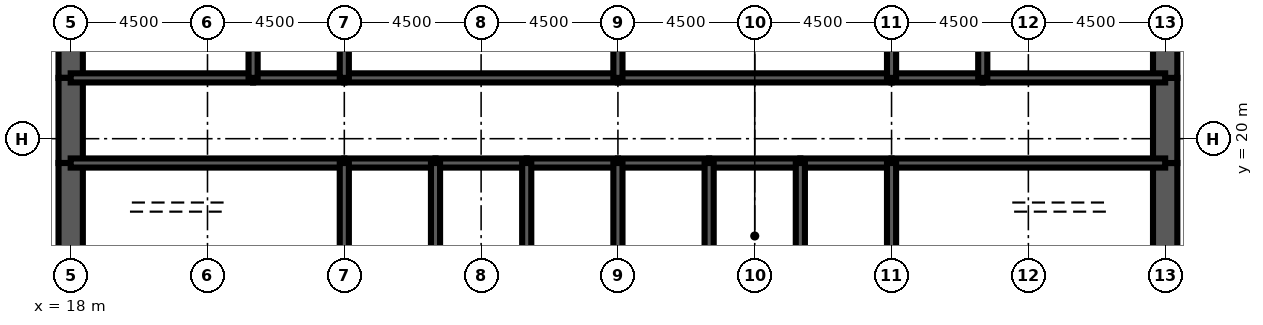
"""IFC4 building model, lengths in metres.
Left out: names, types, materials, properties, quantities, classifications, styles, units other than length and angle.
Written with IfcOpenShell. Run it as: python <this file> out.ifc"""

import sys

from ifc_helpers import new_model, si_unit, direction, frame, frame_2d, origin, place, context, subcontext, project, spatial, rectangle, extrude, element, fill, save


model = new_model("IFC4")
c1 = context("Model", 3, precision=1e-05, world=origin(), true_north=direction((0.0, 1.0)))
c2 = subcontext(c1, "Body", "Model", "MODEL_VIEW")
j1 = project(units=[si_unit("LENGTHUNIT", "METRE"), si_unit("PLANEANGLEUNIT", "RADIAN")], contexts=[c1])
p1 = place(None, origin())
s1 = spatial("IfcSite", under=j1, at=p1, CompositionType="ELEMENT")
p2 = place(p1, origin())
s2 = spatial("IfcBuilding", under=s1, at=p2, CompositionType="ELEMENT")
p3 = place(p2, frame((0.0, 0.0, 185.8)))
s3 = spatial("IfcBuildingStorey", under=s2, at=p3, CompositionType="ELEMENT", Elevation=185.8)
p4 = place(p3, frame((18.0, 26.0, 0.0), z_axis=(0.0, 0.0, 1.0), x_axis=(0.0, -1.0, 0.0)))
e1 = element("IfcWall", 1, at=p4, inside=s3, PredefinedType="SHEAR", context=c2, shape_type="SweptSolid", body=[
    extrude(rectangle(XDim=4.0, YDim=0.8, at=frame_2d((2.0, 0.0))), origin(), (0.0, 0.0, 1.0), 4.2),
])
p5 = place(p3, frame((18.0, 22.0, 0.0), z_axis=(0.0, 0.0, 1.0), x_axis=(0.0, -1.0, 0.0)))
e2 = element("IfcWall", 2, at=p5, inside=s3, PredefinedType="SHEAR", context=c2, shape_type="SweptSolid", body=[
    extrude(rectangle(XDim=2.8, YDim=0.8, at=frame_2d((1.4, 0.0))), origin(), (0.0, 0.0, 1.0), 4.2),
])
p6 = place(p5, frame((0.6, 0.0, 0.0)))
e3 = element("IfcOpeningElement", 3, at=p6, cuts=e2, PredefinedType="OPENING", context=c2, shape_type="SweptSolid", body=[
    extrude(rectangle(XDim=1.8, YDim=2.1, at=frame_2d((0.9, 1.05))), frame((0.0, 0.41, 0.0), z_axis=(0.0, -1.0, 0.0), x_axis=(1.0, 0.0, 0.0)), (0.0, 0.0, 1.0), 0.82),
])
for number, where, z_axis, x_axis in (
    (4, (18.0, 19.2, 0.0), (0.0, 0.0, 1.0), (0.0, -1.0, 0.0)),
    (5, (54.0, 16.0, 0.0), (0.0, 0.0, 1.0), (0.0, 1.0, 0.0)),
):
    element("IfcWall", number, at=place(p3, frame(where, z_axis=z_axis, x_axis=x_axis)), inside=s3, PredefinedType="SHEAR", context=c2, shape_type="SweptSolid", body=[
        extrude(rectangle(XDim=3.2, YDim=0.8, at=frame_2d((1.6, 0.0))), origin(), (0.0, 0.0, 1.0), 4.2),
    ])
p7 = place(p3, frame((54.0, 19.2, 0.0), z_axis=(0.0, 0.0, 1.0), x_axis=(0.0, 1.0, 0.0)))
e6 = element("IfcWall", 6, at=p7, inside=s3, PredefinedType="SHEAR", context=c2, shape_type="SweptSolid", body=[
    extrude(rectangle(XDim=2.8, YDim=0.8, at=frame_2d((1.4, 0.0))), origin(), (0.0, 0.0, 1.0), 4.2),
])
p8 = place(p7, frame((0.4, 0.0, 0.0)))
e7 = element("IfcOpeningElement", 7, at=p8, cuts=e6, PredefinedType="OPENING", context=c2, shape_type="SweptSolid", body=[
    extrude(rectangle(XDim=1.8, YDim=2.1, at=frame_2d((0.9, 1.05))), frame((0.0, 0.41, 0.0), z_axis=(0.0, -1.0, 0.0), x_axis=(1.0, 0.0, 0.0)), (0.0, 0.0, 1.0), 0.82),
])
p9 = place(p3, frame((54.0, 22.0, 0.0), z_axis=(0.0, 0.0, 1.0), x_axis=(0.0, 1.0, 0.0)))
e8 = element("IfcWall", 8, at=p9, inside=s3, PredefinedType="SHEAR", context=c2, shape_type="SweptSolid", body=[
    extrude(rectangle(XDim=4.0, YDim=0.8, at=frame_2d((2.0, 0.0))), origin(), (0.0, 0.0, 1.0), 4.2),
])
p10 = place(p3, frame((18.0, 19.2, 0.0), z_axis=(0.0, 0.0, 1.0), x_axis=(1.0, 0.0, 0.0)))
e9 = element("IfcWall", 9, at=p10, inside=s3, PredefinedType="SOLIDWALL", context=c2, shape_type="SweptSolid", body=[
    extrude(rectangle(XDim=9.0, YDim=0.3, at=frame_2d((4.5, 0.0))), origin(), (0.0, 0.0, 1.0), 4.2),
])
p11 = place(p10, frame((0.65, 0.0, 0.0)))
e10 = element("IfcOpeningElement", 10, at=p11, cuts=e9, PredefinedType="OPENING", context=c2, shape_type="SweptSolid", body=[
    extrude(rectangle(XDim=1.0, YDim=2.1, at=frame_2d((0.5, 1.05))), frame((0.0, 0.16, 0.0), z_axis=(0.0, -1.0, 0.0), x_axis=(1.0, 0.0, 0.0)), (0.0, 0.0, 1.0), 0.32),
])
p12 = place(p3, frame((27.0, 19.2, 0.0), z_axis=(0.0, 0.0, 1.0), x_axis=(1.0, 0.0, 0.0)))
e11 = element("IfcWall", 11, at=p12, inside=s3, PredefinedType="SOLIDWALL", context=c2, shape_type="SweptSolid", body=[
    extrude(rectangle(XDim=3.0, YDim=0.3, at=frame_2d((1.5, 0.0))), origin(), (0.0, 0.0, 1.0), 4.2),
])
p13 = place(p12, frame((0.95, 0.0, 0.0)))
e12 = element("IfcOpeningElement", 12, at=p13, cuts=e11, PredefinedType="OPENING", context=c2, shape_type="SweptSolid", body=[
    extrude(rectangle(XDim=1.1, YDim=2.2, at=frame_2d((0.55, 1.1))), frame((0.0, 0.16, 0.0), z_axis=(0.0, -1.0, 0.0), x_axis=(1.0, 0.0, 0.0)), (0.0, 0.0, 1.0), 0.32),
])
p14 = place(p3, frame((30.0, 19.2, 0.0), z_axis=(0.0, 0.0, 1.0), x_axis=(1.0, 0.0, 0.0)))
e13 = element("IfcWall", 13, at=p14, inside=s3, PredefinedType="SOLIDWALL", context=c2, shape_type="SweptSolid", body=[
    extrude(rectangle(XDim=3.0, YDim=0.3, at=frame_2d((1.5, 0.0))), origin(), (0.0, 0.0, 1.0), 4.2),
])
p15 = place(p14, frame((0.95, 0.0, 0.0)))
e14 = element("IfcOpeningElement", 14, at=p15, cuts=e13, PredefinedType="OPENING", context=c2, shape_type="SweptSolid", body=[
    extrude(rectangle(XDim=1.1, YDim=2.2, at=frame_2d((0.55, 1.1))), frame((0.0, 0.16, 0.0), z_axis=(0.0, -1.0, 0.0), x_axis=(1.0, 0.0, 0.0)), (0.0, 0.0, 1.0), 0.32),
])
p16 = place(p3, frame((33.0, 19.2, 0.0), z_axis=(0.0, 0.0, 1.0), x_axis=(1.0, 0.0, 0.0)))
e15 = element("IfcWall", 15, at=p16, inside=s3, PredefinedType="SOLIDWALL", context=c2, shape_type="SweptSolid", body=[
    extrude(rectangle(XDim=3.0, YDim=0.3, at=frame_2d((1.5, 0.0))), origin(), (0.0, 0.0, 1.0), 4.2),
])
p17 = place(p16, frame((0.95, 0.0, 0.0)))
e16 = element("IfcOpeningElement", 16, at=p17, cuts=e15, PredefinedType="OPENING", context=c2, shape_type="SweptSolid", body=[
    extrude(rectangle(XDim=1.1, YDim=2.2, at=frame_2d((0.55, 1.1))), frame((0.0, 0.16, 0.0), z_axis=(0.0, -1.0, 0.0), x_axis=(1.0, 0.0, 0.0)), (0.0, 0.0, 1.0), 0.32),
])
p18 = place(p3, frame((36.0, 19.2, 0.0), z_axis=(0.0, 0.0, 1.0), x_axis=(1.0, 0.0, 0.0)))
e17 = element("IfcWall", 17, at=p18, inside=s3, PredefinedType="SOLIDWALL", context=c2, shape_type="SweptSolid", body=[
    extrude(rectangle(XDim=3.0, YDim=0.3, at=frame_2d((1.5, 0.0))), origin(), (0.0, 0.0, 1.0), 4.2),
])
p19 = place(p18, frame((0.95, 0.0, 0.0)))
e18 = element("IfcOpeningElement", 18, at=p19, cuts=e17, PredefinedType="OPENING", context=c2, shape_type="SweptSolid", body=[
    extrude(rectangle(XDim=1.1, YDim=2.2, at=frame_2d((0.55, 1.1))), frame((0.0, 0.16, 0.0), z_axis=(0.0, -1.0, 0.0), x_axis=(1.0, 0.0, 0.0)), (0.0, 0.0, 1.0), 0.32),
])
p20 = place(p3, frame((39.0, 19.2, 0.0), z_axis=(0.0, 0.0, 1.0), x_axis=(1.0, 0.0, 0.0)))
e19 = element("IfcWall", 19, at=p20, inside=s3, PredefinedType="SOLIDWALL", context=c2, shape_type="SweptSolid", body=[
    extrude(rectangle(XDim=3.0, YDim=0.3, at=frame_2d((1.5, 0.0))), origin(), (0.0, 0.0, 1.0), 4.2),
])
p21 = place(p20, frame((1.0, 0.0, 0.0)))
e20 = element("IfcOpeningElement", 20, at=p21, cuts=e19, PredefinedType="OPENING", context=c2, shape_type="SweptSolid", body=[
    extrude(rectangle(XDim=1.0, YDim=2.1, at=frame_2d((0.5, 1.05))), frame((0.0, 0.16, 0.0), z_axis=(0.0, -1.0, 0.0), x_axis=(1.0, 0.0, 0.0)), (0.0, 0.0, 1.0), 0.32),
])
p22 = place(p3, frame((42.0, 19.2, 0.0), z_axis=(0.0, 0.0, 1.0), x_axis=(1.0, 0.0, 0.0)))
e21 = element("IfcWall", 21, at=p22, inside=s3, PredefinedType="SOLIDWALL", context=c2, shape_type="SweptSolid", body=[
    extrude(rectangle(XDim=3.0, YDim=0.3, at=frame_2d((1.5, 0.0))), origin(), (0.0, 0.0, 1.0), 4.2),
])
p23 = place(p22, frame((0.95, 0.0, 0.0)))
e22 = element("IfcOpeningElement", 22, at=p23, cuts=e21, PredefinedType="OPENING", context=c2, shape_type="SweptSolid", body=[
    extrude(rectangle(XDim=1.1, YDim=2.2, at=frame_2d((0.55, 1.1))), frame((0.0, 0.16, 0.0), z_axis=(0.0, -1.0, 0.0), x_axis=(1.0, 0.0, 0.0)), (0.0, 0.0, 1.0), 0.32),
])
p24 = place(p3, frame((45.0, 19.2, 0.0), z_axis=(0.0, 0.0, 1.0), x_axis=(1.0, 0.0, 0.0)))
e23 = element("IfcWall", 23, at=p24, inside=s3, PredefinedType="SOLIDWALL", context=c2, shape_type="SweptSolid", body=[
    extrude(rectangle(XDim=9.0, YDim=0.3, at=frame_2d((4.5, 0.0))), origin(), (0.0, 0.0, 1.0), 4.2),
])
p25 = place(p24, frame((7.35, 0.0, 0.0)))
e24 = element("IfcOpeningElement", 24, at=p25, cuts=e23, PredefinedType="OPENING", context=c2, shape_type="SweptSolid", body=[
    extrude(rectangle(XDim=1.0, YDim=2.1, at=frame_2d((0.5, 1.05))), frame((0.0, 0.16, 0.0), z_axis=(0.0, -1.0, 0.0), x_axis=(1.0, 0.0, 0.0)), (0.0, 0.0, 1.0), 0.32),
])
p26 = place(p3, frame((18.0, 22.0, 0.0), z_axis=(0.0, 0.0, 1.0), x_axis=(1.0, 0.0, 0.0)))
e25 = element("IfcWall", 25, at=p26, inside=s3, PredefinedType="SOLIDWALL", context=c2, shape_type="SweptSolid", body=[
    extrude(rectangle(XDim=6.0, YDim=0.3, at=frame_2d((3.0, 0.0))), origin(), (0.0, 0.0, 1.0), 4.2),
])
p27 = place(p26, frame((2.0, 0.0, 0.0)))
e26 = element("IfcOpeningElement", 26, at=p27, cuts=e25, PredefinedType="OPENING", context=c2, shape_type="SweptSolid", body=[
    extrude(rectangle(XDim=1.0, YDim=2.1, at=frame_2d((0.5, 1.05))), frame((0.0, 0.16, 0.0), z_axis=(0.0, -1.0, 0.0), x_axis=(1.0, 0.0, 0.0)), (0.0, 0.0, 1.0), 0.32),
])
p28 = place(p3, frame((24.0, 22.0, 0.0), z_axis=(0.0, 0.0, 1.0), x_axis=(1.0, 0.0, 0.0)))
e27 = element("IfcWall", 27, at=p28, inside=s3, PredefinedType="SOLIDWALL", context=c2, shape_type="SweptSolid", body=[
    extrude(rectangle(XDim=3.0, YDim=0.3, at=frame_2d((1.5, 0.0))), origin(), (0.0, 0.0, 1.0), 4.2),
])
p29 = place(p28, frame((1.0, 0.0, 0.0)))
e28 = element("IfcOpeningElement", 28, at=p29, cuts=e27, PredefinedType="OPENING", context=c2, shape_type="SweptSolid", body=[
    extrude(rectangle(XDim=1.0, YDim=2.1, at=frame_2d((0.5, 1.05))), frame((0.0, 0.16, 0.0), z_axis=(0.0, -1.0, 0.0), x_axis=(1.0, 0.0, 0.0)), (0.0, 0.0, 1.0), 0.32),
])
p30 = place(p3, frame((27.0, 22.0, 0.0), z_axis=(0.0, 0.0, 1.0), x_axis=(1.0, 0.0, 0.0)))
e29 = element("IfcWall", 29, at=p30, inside=s3, PredefinedType="SOLIDWALL", context=c2, shape_type="SweptSolid", body=[
    extrude(rectangle(XDim=9.0, YDim=0.3, at=frame_2d((4.5, 0.0))), origin(), (0.0, 0.0, 1.0), 4.2),
])
p31 = place(p30, frame((4.0, 0.0, 0.0)))
e30 = element("IfcOpeningElement", 30, at=p31, cuts=e29, PredefinedType="OPENING", context=c2, shape_type="SweptSolid", body=[
    extrude(rectangle(XDim=1.0, YDim=2.1, at=frame_2d((0.5, 1.05))), frame((0.0, 0.16, 0.0), z_axis=(0.0, -1.0, 0.0), x_axis=(1.0, 0.0, 0.0)), (0.0, 0.0, 1.0), 0.32),
])
p32 = place(p3, frame((36.0, 22.0, 0.0), z_axis=(0.0, 0.0, 1.0), x_axis=(1.0, 0.0, 0.0)))
e31 = element("IfcWall", 31, at=p32, inside=s3, PredefinedType="SOLIDWALL", context=c2, shape_type="SweptSolid", body=[
    extrude(rectangle(XDim=9.0, YDim=0.3, at=frame_2d((4.5, 0.0))), origin(), (0.0, 0.0, 1.0), 4.2),
])
p33 = place(p32, frame((4.0, 0.0, 0.0)))
e32 = element("IfcOpeningElement", 32, at=p33, cuts=e31, PredefinedType="OPENING", context=c2, shape_type="SweptSolid", body=[
    extrude(rectangle(XDim=1.0, YDim=2.1, at=frame_2d((0.5, 1.05))), frame((0.0, 0.16, 0.0), z_axis=(0.0, -1.0, 0.0), x_axis=(1.0, 0.0, 0.0)), (0.0, 0.0, 1.0), 0.32),
])
p34 = place(p3, frame((45.0, 22.0, 0.0), z_axis=(0.0, 0.0, 1.0), x_axis=(1.0, 0.0, 0.0)))
e33 = element("IfcWall", 33, at=p34, inside=s3, PredefinedType="SOLIDWALL", context=c2, shape_type="SweptSolid", body=[
    extrude(rectangle(XDim=3.0, YDim=0.3, at=frame_2d((1.5, 0.0))), origin(), (0.0, 0.0, 1.0), 4.2),
])
p35 = place(p34, frame((1.0, 0.0, 0.0)))
e34 = element("IfcOpeningElement", 34, at=p35, cuts=e33, PredefinedType="OPENING", context=c2, shape_type="SweptSolid", body=[
    extrude(rectangle(XDim=1.0, YDim=2.1, at=frame_2d((0.5, 1.05))), frame((0.0, 0.16, 0.0), z_axis=(0.0, -1.0, 0.0), x_axis=(1.0, 0.0, 0.0)), (0.0, 0.0, 1.0), 0.32),
])
p36 = place(p3, frame((48.0, 22.0, 0.0), z_axis=(0.0, 0.0, 1.0), x_axis=(1.0, 0.0, 0.0)))
e35 = element("IfcWall", 35, at=p36, inside=s3, PredefinedType="SOLIDWALL", context=c2, shape_type="SweptSolid", body=[
    extrude(rectangle(XDim=6.0, YDim=0.3, at=frame_2d((3.0, 0.0))), origin(), (0.0, 0.0, 1.0), 4.2),
])
p37 = place(p36, frame((2.0, 0.0, 0.0)))
e36 = element("IfcOpeningElement", 36, at=p37, cuts=e35, PredefinedType="OPENING", context=c2, shape_type="SweptSolid", body=[
    extrude(rectangle(XDim=1.0, YDim=2.1, at=frame_2d((0.5, 1.05))), frame((0.0, 0.16, 0.0), z_axis=(0.0, -1.0, 0.0), x_axis=(1.0, 0.0, 0.0)), (0.0, 0.0, 1.0), 0.32),
])
for number, where, z_axis, x_axis in (
    (37, (27.0, 16.0, 0.0), (0.0, 0.0, 1.0), (0.0, 1.0, 0.0)),
    (38, (30.0, 16.0, 0.0), (0.0, 0.0, 1.0), (0.0, 1.0, 0.0)),
    (39, (33.0, 16.0, 0.0), (0.0, 0.0, 1.0), (0.0, 1.0, 0.0)),
    (40, (36.0, 16.0, 0.0), (0.0, 0.0, 1.0), (0.0, 1.0, 0.0)),
    (41, (39.0, 16.0, 0.0), (0.0, 0.0, 1.0), (0.0, 1.0, 0.0)),
    (42, (42.0, 16.0, 0.0), (0.0, 0.0, 1.0), (0.0, 1.0, 0.0)),
    (43, (45.0, 16.0, 0.0), (0.0, 0.0, 1.0), (0.0, 1.0, 0.0)),
):
    element("IfcWall", number, at=place(p3, frame(where, z_axis=z_axis, x_axis=x_axis)), inside=s3, PredefinedType="SOLIDWALL", context=c2, shape_type="SweptSolid", body=[
        extrude(rectangle(XDim=3.2, YDim=0.3, at=frame_2d((1.6, 0.0))), origin(), (0.0, 0.0, 1.0), 4.2),
    ])
for number, where, z_axis, x_axis in (
    (44, (24.0, 22.0, 0.0), (0.0, 0.0, 1.0), (0.0, 1.0, 0.0)),
    (45, (27.0, 22.0, 0.0), (0.0, 0.0, 1.0), (0.0, 1.0, 0.0)),
    (46, (36.0, 22.0, 0.0), (0.0, 0.0, 1.0), (0.0, 1.0, 0.0)),
    (47, (45.0, 22.0, 0.0), (0.0, 0.0, 1.0), (0.0, 1.0, 0.0)),
    (48, (48.0, 22.0, 0.0), (0.0, 0.0, 1.0), (0.0, 1.0, 0.0)),
):
    element("IfcWall", number, at=place(p3, frame(where, z_axis=z_axis, x_axis=x_axis)), inside=s3, PredefinedType="SOLIDWALL", context=c2, shape_type="SweptSolid", body=[
        extrude(rectangle(XDim=4.0, YDim=0.3, at=frame_2d((2.0, 0.0))), origin(), (0.0, 0.0, 1.0), 4.2),
    ])
p38 = place(p3, frame((39.15, 17.35, 0.0), z_axis=(0.0, 0.0, 1.0), x_axis=(1.0, 0.0, 0.0)))
e49 = element("IfcWall", 49, at=p38, inside=s3, PredefinedType="SOLIDWALL", context=c2, shape_type="SweptSolid", body=[
    extrude(rectangle(XDim=2.7, YDim=0.3, at=frame_2d((1.35, 0.0))), origin(), (0.0, 0.0, 1.0), 4.04),
])
p39 = place(p38, frame((0.85, 0.0, 0.0)))
e50 = element("IfcOpeningElement", 50, at=p39, cuts=e49, PredefinedType="OPENING", context=c2, shape_type="SweptSolid", body=[
    extrude(rectangle(XDim=1.0, YDim=2.1, at=frame_2d((0.5, 1.05))), frame((0.0, 0.16, 0.0), z_axis=(0.0, -1.0, 0.0), x_axis=(1.0, 0.0, 0.0)), (0.0, 0.0, 1.0), 0.32),
])
p40 = place(p39, origin())
e51 = element("IfcDoor", 51, at=p40, inside=s3, OperationType="SINGLE_SWING_LEFT", PredefinedType="DOOR", context=c2, shape_type="SweptSolid", body=[
    extrude(rectangle(XDim=1.0, YDim=2.1, at=frame_2d((0.5, 1.05))), frame((0.0, 0.025, 0.0), z_axis=(0.0, -1.0, 0.0), x_axis=(1.0, 0.0, 0.0)), (0.0, 0.0, 1.0), 0.05),
])
fill(e50, e51)
p41 = place(p13, origin())
e52 = element("IfcDoor", 52, at=p41, inside=s3, OperationType="DOUBLE_DOOR_SLIDING", PredefinedType="USERDEFINED", context=c2, shape_type="SweptSolid", body=[
    extrude(rectangle(XDim=1.1, YDim=2.2, at=frame_2d((0.55, 1.1))), frame((0.0, 0.025, 0.0), z_axis=(0.0, -1.0, 0.0), x_axis=(1.0, 0.0, 0.0)), (0.0, 0.0, 1.0), 0.05),
])
fill(e12, e52)
p42 = place(p23, origin())
e53 = element("IfcDoor", 53, at=p42, inside=s3, OperationType="DOUBLE_DOOR_SLIDING", PredefinedType="USERDEFINED", context=c2, shape_type="SweptSolid", body=[
    extrude(rectangle(XDim=1.1, YDim=2.2, at=frame_2d((0.55, 1.1))), frame((0.0, 0.025, 0.0), z_axis=(0.0, -1.0, 0.0), x_axis=(1.0, 0.0, 0.0)), (0.0, 0.0, 1.0), 0.05),
])
fill(e22, e53)
p43 = place(p15, origin())
e54 = element("IfcDoor", 54, at=p43, inside=s3, OperationType="DOUBLE_DOOR_SLIDING", PredefinedType="USERDEFINED", context=c2, shape_type="SweptSolid", body=[
    extrude(rectangle(XDim=1.1, YDim=2.2, at=frame_2d((0.55, 1.1))), frame((0.0, 0.025, 0.0), z_axis=(0.0, -1.0, 0.0), x_axis=(1.0, 0.0, 0.0)), (0.0, 0.0, 1.0), 0.05),
])
fill(e14, e54)
p44 = place(p17, origin())
e55 = element("IfcDoor", 55, at=p44, inside=s3, OperationType="DOUBLE_DOOR_SLIDING", PredefinedType="USERDEFINED", context=c2, shape_type="SweptSolid", body=[
    extrude(rectangle(XDim=1.1, YDim=2.2, at=frame_2d((0.55, 1.1))), frame((0.0, 0.025, 0.0), z_axis=(0.0, -1.0, 0.0), x_axis=(1.0, 0.0, 0.0)), (0.0, 0.0, 1.0), 0.05),
])
fill(e16, e55)
p45 = place(p19, origin())
e56 = element("IfcDoor", 56, at=p45, inside=s3, OperationType="DOUBLE_DOOR_SLIDING", PredefinedType="USERDEFINED", context=c2, shape_type="SweptSolid", body=[
    extrude(rectangle(XDim=1.1, YDim=2.2, at=frame_2d((0.55, 1.1))), frame((0.0, 0.025, 0.0), z_axis=(0.0, -1.0, 0.0), x_axis=(1.0, 0.0, 0.0)), (0.0, 0.0, 1.0), 0.05),
])
fill(e18, e56)
p46 = place(p11, origin())
e57 = element("IfcDoor", 57, at=p46, inside=s3, OperationType="SINGLE_SWING_LEFT", PredefinedType="DOOR", context=c2, shape_type="SweptSolid", body=[
    extrude(rectangle(XDim=1.0, YDim=2.1, at=frame_2d((0.5, 1.05))), frame((0.0, 0.025, 0.0), z_axis=(0.0, -1.0, 0.0), x_axis=(1.0, 0.0, 0.0)), (0.0, 0.0, 1.0), 0.05),
])
fill(e10, e57)
p47 = place(p25, origin())
e58 = element("IfcDoor", 58, at=p47, inside=s3, OperationType="SINGLE_SWING_RIGHT", PredefinedType="DOOR", context=c2, shape_type="SweptSolid", body=[
    extrude(rectangle(XDim=1.0, YDim=2.1, at=frame_2d((0.5, 1.05))), frame((0.0, 0.025, 0.0), z_axis=(0.0, -1.0, 0.0), x_axis=(1.0, 0.0, 0.0)), (0.0, 0.0, 1.0), 0.05),
])
fill(e24, e58)
p48 = place(p6, origin())
e59 = element("IfcDoor", 59, at=p48, inside=s3, OperationType="SINGLE_SWING_LEFT", PredefinedType="DOOR", context=c2, shape_type="SweptSolid", body=[
    extrude(rectangle(XDim=1.8, YDim=2.1, at=frame_2d((0.9, 1.05))), frame((0.0, 0.4, 0.0), z_axis=(0.0, -1.0, 0.0), x_axis=(1.0, 0.0, 0.0)), (0.0, 0.0, 1.0), 0.8),
])
fill(e3, e59)
p49 = place(p8, origin())
e60 = element("IfcDoor", 60, at=p49, inside=s3, OperationType="SINGLE_SWING_LEFT", PredefinedType="DOOR", context=c2, shape_type="SweptSolid", body=[
    extrude(rectangle(XDim=1.8, YDim=2.1, at=frame_2d((0.9, 1.05))), frame((0.0, 0.4, 0.0), z_axis=(0.0, -1.0, 0.0), x_axis=(1.0, 0.0, 0.0)), (0.0, 0.0, 1.0), 0.8),
])
fill(e7, e60)
p50 = place(p27, origin())
e61 = element("IfcDoor", 61, at=p50, inside=s3, OperationType="SINGLE_SWING_LEFT", PredefinedType="DOOR", context=c2, shape_type="SweptSolid", body=[
    extrude(rectangle(XDim=1.0, YDim=2.1, at=frame_2d((0.5, 1.05))), frame((0.0, 0.025, 0.0), z_axis=(0.0, -1.0, 0.0), x_axis=(1.0, 0.0, 0.0)), (0.0, 0.0, 1.0), 0.05),
])
fill(e26, e61)
p51 = place(p29, origin())
e62 = element("IfcDoor", 62, at=p51, inside=s3, OperationType="SINGLE_SWING_LEFT", PredefinedType="DOOR", context=c2, shape_type="SweptSolid", body=[
    extrude(rectangle(XDim=1.0, YDim=2.1, at=frame_2d((0.5, 1.05))), frame((0.0, 0.025, 0.0), z_axis=(0.0, -1.0, 0.0), x_axis=(1.0, 0.0, 0.0)), (0.0, 0.0, 1.0), 0.05),
])
fill(e28, e62)
p52 = place(p31, origin())
e63 = element("IfcDoor", 63, at=p52, inside=s3, OperationType="SINGLE_SWING_LEFT", PredefinedType="DOOR", context=c2, shape_type="SweptSolid", body=[
    extrude(rectangle(XDim=1.0, YDim=2.1, at=frame_2d((0.5, 1.05))), frame((0.0, 0.025, 0.0), z_axis=(0.0, -1.0, 0.0), x_axis=(1.0, 0.0, 0.0)), (0.0, 0.0, 1.0), 0.05),
])
fill(e30, e63)
p53 = place(p33, origin())
e64 = element("IfcDoor", 64, at=p53, inside=s3, OperationType="SINGLE_SWING_LEFT", PredefinedType="DOOR", context=c2, shape_type="SweptSolid", body=[
    extrude(rectangle(XDim=1.0, YDim=2.1, at=frame_2d((0.5, 1.05))), frame((0.0, 0.025, 0.0), z_axis=(0.0, -1.0, 0.0), x_axis=(1.0, 0.0, 0.0)), (0.0, 0.0, 1.0), 0.05),
])
fill(e32, e64)
p54 = place(p35, origin())
e65 = element("IfcDoor", 65, at=p54, inside=s3, OperationType="SINGLE_SWING_LEFT", PredefinedType="DOOR", context=c2, shape_type="SweptSolid", body=[
    extrude(rectangle(XDim=1.0, YDim=2.1, at=frame_2d((0.5, 1.05))), frame((0.0, 0.025, 0.0), z_axis=(0.0, -1.0, 0.0), x_axis=(1.0, 0.0, 0.0)), (0.0, 0.0, 1.0), 0.05),
])
fill(e34, e65)
p55 = place(p37, origin())
e66 = element("IfcDoor", 66, at=p55, inside=s3, OperationType="SINGLE_SWING_LEFT", PredefinedType="DOOR", context=c2, shape_type="SweptSolid", body=[
    extrude(rectangle(XDim=1.0, YDim=2.1, at=frame_2d((0.5, 1.05))), frame((0.0, 0.025, 0.0), z_axis=(0.0, -1.0, 0.0), x_axis=(1.0, 0.0, 0.0)), (0.0, 0.0, 1.0), 0.05),
])
fill(e36, e66)
p56 = place(p21, origin())
e67 = element("IfcDoor", 67, at=p56, inside=s3, OperationType="SINGLE_SWING_LEFT", PredefinedType="DOOR", context=c2, shape_type="SweptSolid", body=[
    extrude(rectangle(XDim=1.0, YDim=2.1, at=frame_2d((0.5, 1.05))), frame((0.0, 0.025, 0.0), z_axis=(0.0, -1.0, 0.0), x_axis=(1.0, 0.0, 0.0)), (0.0, 0.0, 1.0), 0.05),
])
fill(e20, e67)
save(model, sys.argv[1])
